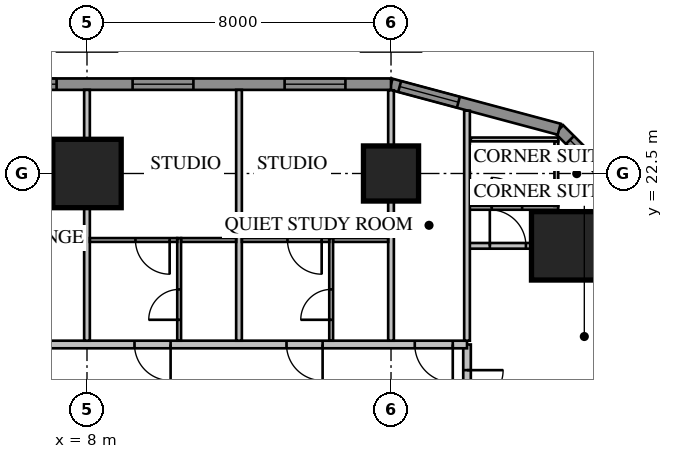
"""IFC4 building model, lengths in metres.
Left out: names, types, materials, properties, quantities, classifications, styles, units other than length and angle.
Written with IfcOpenShell. Run it as: python <this file> out.ifc"""

import sys

from ifc_helpers import new_model, si_unit, direction, frame, frame_2d, origin, origin_2d, place, context, subcontext, project, spatial, rectangle, extrude, element, fill, save


model = new_model("IFC4")
c1 = context("Model", 3, precision=1e-05, world=origin(), true_north=direction((0.0, 1.0)))
c2 = subcontext(c1, "Body", "Model", "MODEL_VIEW")
j1 = project(units=[si_unit("LENGTHUNIT", "METRE"), si_unit("PLANEANGLEUNIT", "RADIAN")], contexts=[c1])
p1 = place(None, origin())
s1 = spatial("IfcSite", under=j1, at=p1, CompositionType="ELEMENT")
p2 = place(p1, origin())
s2 = spatial("IfcBuilding", under=s1, at=p2, CompositionType="ELEMENT")
p3 = place(p2, frame((0.0, 0.0, 23.7)))
s3 = spatial("IfcBuildingStorey", under=s2, at=p3, CompositionType="ELEMENT", Elevation=23.7)
p4 = place(p3, frame((20.596, 20.596, 0.0), z_axis=(0.0, 0.0, 1.0), x_axis=(1.0, 0.0, 0.0)))
e1 = element("IfcColumn", 1, at=p4, inside=s3, PredefinedType="COLUMN", context=c2, shape_type="SweptSolid", body=[
    extrude(rectangle(XDim=1.8, YDim=1.8, at=origin_2d()), origin(), (0.0, 0.0, 1.0), 3.85),
])
p5 = place(p3, frame((16.0, 22.5, 0.0), z_axis=(0.0, 0.0, 1.0), x_axis=(1.0, 0.0, 0.0)))
e2 = element("IfcColumn", 2, at=p5, inside=s3, PredefinedType="COLUMN", context=c2, shape_type="SweptSolid", body=[
    extrude(rectangle(XDim=1.45, YDim=1.45, at=origin_2d()), origin(), (0.0, 0.0, 1.0), 3.85),
])
p6 = place(p3, frame((8.0, 22.5, 0.0), z_axis=(0.0, 0.0, 1.0), x_axis=(1.0, 0.0, 0.0)))
e3 = element("IfcColumn", 3, at=p6, inside=s3, PredefinedType="COLUMN", context=c2, shape_type="SweptSolid", body=[
    extrude(rectangle(XDim=1.8, YDim=1.8, at=origin_2d()), origin(), (0.0, 0.0, 1.0), 3.85),
])
p7 = place(p3, frame((23.664, 20.425, 0.0), z_axis=(0.0, 0.0, 1.0), x_axis=(-0.707106781187, 0.707106781187, 0.0)))
e4 = element("IfcWall", 4, at=p7, inside=s3, PredefinedType="SOLIDWALL", context=c2, shape_type="SweptSolid", body=[
    extrude(rectangle(XDim=4.581, YDim=0.3, at=frame_2d((2.291, 0.0))), origin(), (0.0, 0.0, 1.0), 3.65),
])
p8 = place(p7, frame((0.4, 0.0, 0.75)))
e5 = element("IfcOpeningElement", 5, at=p8, cuts=e4, PredefinedType="OPENING", context=c2, shape_type="SweptSolid", body=[
    extrude(rectangle(XDim=3.781, YDim=1.8, at=frame_2d((1.891, 0.9))), frame((0.0, 0.17, 0.0), z_axis=(0.0, -1.0, 0.0), x_axis=(1.0, 0.0, 0.0)), (0.0, 0.0, 1.0), 0.34),
])
p9 = place(p3, frame((20.425, 23.664, 0.0), z_axis=(0.0, 0.0, 1.0), x_axis=(-0.965920218567, 0.258839972501, 0.0)))
e6 = element("IfcWall", 6, at=p9, inside=s3, PredefinedType="SOLIDWALL", context=c2, shape_type="SweptSolid", body=[
    extrude(rectangle(XDim=4.581, YDim=0.3, at=frame_2d((2.291, 0.0))), origin(), (0.0, 0.0, 1.0), 3.65),
])
p10 = place(p9, frame((2.746, 0.0, 0.75)))
e7 = element("IfcOpeningElement", 7, at=p10, cuts=e6, PredefinedType="OPENING", context=c2, shape_type="SweptSolid", body=[
    extrude(rectangle(XDim=1.6, YDim=1.8, at=frame_2d((0.8, 0.9))), frame((0.0, 0.17, 0.0), z_axis=(0.0, -1.0, 0.0), x_axis=(1.0, 0.0, 0.0)), (0.0, 0.0, 1.0), 0.34),
])
p11 = place(p3, frame((16.0, 24.85, 0.0), z_axis=(0.0, 0.0, 1.0), x_axis=(-1.0, 0.0, 0.0)))
e8 = element("IfcWall", 8, at=p11, inside=s3, PredefinedType="SOLIDWALL", context=c2, shape_type="SweptSolid", body=[
    extrude(rectangle(XDim=32.0, YDim=0.3, at=frame_2d((16.0, 0.0))), origin(), (0.0, 0.0, 1.0), 3.65),
])
p12 = place(p11, frame((1.2, 0.0, 0.75)))
e9 = element("IfcOpeningElement", 9, at=p12, cuts=e8, PredefinedType="OPENING", context=c2, shape_type="SweptSolid", body=[
    extrude(rectangle(XDim=1.6, YDim=1.8, at=frame_2d((0.8, 0.9))), frame((0.0, 0.17, 0.0), z_axis=(0.0, -1.0, 0.0), x_axis=(1.0, 0.0, 0.0)), (0.0, 0.0, 1.0), 0.34),
])
p13 = place(p11, frame((5.2, 0.0, 0.75)))
e10 = element("IfcOpeningElement", 10, at=p13, cuts=e8, PredefinedType="OPENING", context=c2, shape_type="SweptSolid", body=[
    extrude(rectangle(XDim=1.6, YDim=1.8, at=frame_2d((0.8, 0.9))), frame((0.0, 0.17, 0.0), z_axis=(0.0, -1.0, 0.0), x_axis=(1.0, 0.0, 0.0)), (0.0, 0.0, 1.0), 0.34),
])
p14 = place(p11, frame((17.2, 0.0, 0.75)))
e11 = element("IfcOpeningElement", 11, at=p14, cuts=e8, PredefinedType="OPENING", context=c2, shape_type="SweptSolid", body=[
    extrude(rectangle(XDim=1.6, YDim=1.8, at=frame_2d((0.8, 0.9))), frame((0.0, 0.17, 0.0), z_axis=(0.0, -1.0, 0.0), x_axis=(1.0, 0.0, 0.0)), (0.0, 0.0, 1.0), 0.34),
])
p15 = place(p11, frame((21.2, 0.0, 0.75)))
e12 = element("IfcOpeningElement", 12, at=p15, cuts=e8, PredefinedType="OPENING", context=c2, shape_type="SweptSolid", body=[
    extrude(rectangle(XDim=1.6, YDim=1.8, at=frame_2d((0.8, 0.9))), frame((0.0, 0.17, 0.0), z_axis=(0.0, -1.0, 0.0), x_axis=(1.0, 0.0, 0.0)), (0.0, 0.0, 1.0), 0.34),
])
p16 = place(p11, frame((25.2, 0.0, 0.75)))
e13 = element("IfcOpeningElement", 13, at=p16, cuts=e8, PredefinedType="OPENING", context=c2, shape_type="SweptSolid", body=[
    extrude(rectangle(XDim=1.6, YDim=1.8, at=frame_2d((0.8, 0.9))), frame((0.0, 0.17, 0.0), z_axis=(0.0, -1.0, 0.0), x_axis=(1.0, 0.0, 0.0)), (0.0, 0.0, 1.0), 0.34),
])
p17 = place(p11, frame((29.2, 0.0, 0.75)))
e14 = element("IfcOpeningElement", 14, at=p17, cuts=e8, PredefinedType="OPENING", context=c2, shape_type="SweptSolid", body=[
    extrude(rectangle(XDim=1.6, YDim=1.8, at=frame_2d((0.8, 0.9))), frame((0.0, 0.17, 0.0), z_axis=(0.0, -1.0, 0.0), x_axis=(1.0, 0.0, 0.0)), (0.0, 0.0, 1.0), 0.34),
])
p18 = place(p11, frame((8.8, 0.0, 0.75)))
e15 = element("IfcOpeningElement", 15, at=p18, cuts=e8, PredefinedType="OPENING", context=c2, shape_type="SweptSolid", body=[
    extrude(rectangle(XDim=2.4, YDim=1.8, at=frame_2d((1.2, 0.9))), frame((0.0, 0.17, 0.0), z_axis=(0.0, -1.0, 0.0), x_axis=(1.0, 0.0, 0.0)), (0.0, 0.0, 1.0), 0.34),
])
p19 = place(p11, frame((13.812, 0.0, 0.0)))
e16 = element("IfcOpeningElement", 16, at=p19, cuts=e8, PredefinedType="OPENING", context=c2, shape_type="SweptSolid", body=[
    extrude(rectangle(XDim=1.0, YDim=2.4, at=frame_2d((0.5, 1.2))), frame((0.0, 0.17, 0.0), z_axis=(0.0, -1.0, 0.0), x_axis=(1.0, 0.0, 0.0)), (0.0, 0.0, 1.0), 0.34),
])
p20 = place(p3, frame((18.0, -18.0, 0.0), z_axis=(0.0, 0.0, 1.0), x_axis=(0.0, 1.0, 0.0)))
e17 = element("IfcWall", 17, at=p20, inside=s3, PredefinedType="PARTITIONING", context=c2, shape_type="SweptSolid", body=[
    extrude(rectangle(XDim=36.0, YDim=0.2, at=frame_2d((18.0, 0.0))), origin(), (0.0, 0.0, 1.0), 3.65),
])
p21 = place(p20, frame((10.4, 0.0, 0.0)))
e18 = element("IfcOpeningElement", 18, at=p21, cuts=e17, PredefinedType="OPENING", context=c2, shape_type="SweptSolid", body=[
    extrude(rectangle(XDim=1.0, YDim=2.1, at=frame_2d((0.5, 1.05))), frame((0.0, 0.12, 0.0), z_axis=(0.0, -1.0, 0.0), x_axis=(1.0, 0.0, 0.0)), (0.0, 0.0, 1.0), 0.24),
])
p22 = place(p20, frame((0.375, 0.0, 0.0)))
e19 = element("IfcOpeningElement", 19, at=p22, cuts=e17, PredefinedType="OPENING", context=c2, shape_type="SweptSolid", body=[
    extrude(rectangle(XDim=1.0, YDim=2.1, at=frame_2d((0.5, 1.05))), frame((0.0, 0.12, 0.0), z_axis=(0.0, -1.0, 0.0), x_axis=(1.0, 0.0, 0.0)), (0.0, 0.0, 1.0), 0.24),
])
p23 = place(p20, frame((34.375, 0.0, 0.0)))
e20 = element("IfcOpeningElement", 20, at=p23, cuts=e17, PredefinedType="OPENING", context=c2, shape_type="SweptSolid", body=[
    extrude(rectangle(XDim=0.95, YDim=2.1, at=frame_2d((0.475, 1.05))), frame((0.0, 0.12, 0.0), z_axis=(0.0, -1.0, 0.0), x_axis=(1.0, 0.0, 0.0)), (0.0, 0.0, 1.0), 0.24),
])
p24 = place(p3, frame((18.065, 21.596, 0.0), z_axis=(0.0, 0.0, 1.0), x_axis=(1.0, 0.0, 0.0)))
e21 = element("IfcWall", 21, at=p24, inside=s3, PredefinedType="PARTITIONING", context=c2, shape_type="SweptSolid", body=[
    extrude(rectangle(XDim=2.335, YDim=0.1, at=frame_2d((1.167, 0.0))), origin(), (0.0, 0.0, 1.0), 3.65),
])
p25 = place(p24, frame((0.585, 0.0, 0.0)))
e22 = element("IfcOpeningElement", 22, at=p25, cuts=e21, PredefinedType="OPENING", context=c2, shape_type="SweptSolid", body=[
    extrude(rectangle(XDim=0.8, YDim=2.1, at=frame_2d((0.4, 1.05))), frame((0.0, 0.07, 0.0), z_axis=(0.0, -1.0, 0.0), x_axis=(1.0, 0.0, 0.0)), (0.0, 0.0, 1.0), 0.14),
])
p26 = place(p3, frame((20.35, 21.646, 0.0), z_axis=(0.0, 0.0, 1.0), x_axis=(0.0, 1.0, 0.0)))
e23 = element("IfcWall", 23, at=p26, inside=s3, PredefinedType="PARTITIONING", context=c2, shape_type="SweptSolid", body=[
    extrude(rectangle(XDim=1.7, YDim=0.1, at=frame_2d((0.85, 0.0))), origin(), (0.0, 0.0, 1.0), 3.65),
])
p27 = place(p3, frame((18.1, 23.396, 0.0), z_axis=(0.0, 0.0, 1.0), x_axis=(1.0, 0.0, 0.0)))
e24 = element("IfcWall", 24, at=p27, inside=s3, PredefinedType="PARTITIONING", context=c2, shape_type="SweptSolid", body=[
    extrude(rectangle(XDim=2.3, YDim=0.1, at=frame_2d((1.15, 0.0))), origin(), (0.0, 0.0, 1.0), 3.65),
])
p28 = place(p3, frame((18.065, 20.596, 0.0), z_axis=(0.0, 0.0, 1.0), x_axis=(1.0, 0.0, 0.0)))
e25 = element("IfcWall", 25, at=p28, inside=s3, PredefinedType="PARTITIONING", context=c2, shape_type="SweptSolid", body=[
    extrude(rectangle(XDim=5.209, YDim=0.15, at=frame_2d((2.604, 0.0))), origin(), (0.0, 0.0, 1.0), 3.65),
])
p29 = place(p28, frame((0.535, 0.0, 0.0)))
e26 = element("IfcOpeningElement", 26, at=p29, cuts=e25, PredefinedType="OPENING", context=c2, shape_type="SweptSolid", body=[
    extrude(rectangle(XDim=0.95, YDim=2.1, at=frame_2d((0.475, 1.05))), frame((0.0, 0.095, 0.0), z_axis=(0.0, -1.0, 0.0), x_axis=(1.0, 0.0, 0.0)), (0.0, 0.0, 1.0), 0.19),
])
p30 = place(p3, frame((18.0, 18.0, 0.0), z_axis=(0.0, 0.0, 1.0), x_axis=(-1.0, 0.0, 0.0)))
e27 = element("IfcWall", 27, at=p30, inside=s3, PredefinedType="PARTITIONING", context=c2, shape_type="SweptSolid", body=[
    extrude(rectangle(XDim=36.0, YDim=0.2, at=frame_2d((18.0, 0.0))), origin(), (0.0, 0.0, 1.0), 3.65),
])
p31 = place(p30, frame((0.375, 0.0, 0.0)))
e28 = element("IfcOpeningElement", 28, at=p31, cuts=e27, PredefinedType="OPENING", context=c2, shape_type="SweptSolid", body=[
    extrude(rectangle(XDim=1.0, YDim=2.1, at=frame_2d((0.5, 1.05))), frame((0.0, 0.12, 0.0), z_axis=(0.0, -1.0, 0.0), x_axis=(1.0, 0.0, 0.0)), (0.0, 0.0, 1.0), 0.24),
])
p32 = place(p30, frame((3.8, 0.0, 0.0)))
e29 = element("IfcOpeningElement", 29, at=p32, cuts=e27, PredefinedType="OPENING", context=c2, shape_type="SweptSolid", body=[
    extrude(rectangle(XDim=0.95, YDim=2.1, at=frame_2d((0.475, 1.05))), frame((0.0, 0.12, 0.0), z_axis=(0.0, -1.0, 0.0), x_axis=(1.0, 0.0, 0.0)), (0.0, 0.0, 1.0), 0.24),
])
p33 = place(p30, frame((7.8, 0.0, 0.0)))
e30 = element("IfcOpeningElement", 30, at=p33, cuts=e27, PredefinedType="OPENING", context=c2, shape_type="SweptSolid", body=[
    extrude(rectangle(XDim=0.95, YDim=2.1, at=frame_2d((0.475, 1.05))), frame((0.0, 0.12, 0.0), z_axis=(0.0, -1.0, 0.0), x_axis=(1.0, 0.0, 0.0)), (0.0, 0.0, 1.0), 0.24),
])
p34 = place(p30, frame((19.8, 0.0, 0.0)))
e31 = element("IfcOpeningElement", 31, at=p34, cuts=e27, PredefinedType="OPENING", context=c2, shape_type="SweptSolid", body=[
    extrude(rectangle(XDim=0.95, YDim=2.1, at=frame_2d((0.475, 1.05))), frame((0.0, 0.12, 0.0), z_axis=(0.0, -1.0, 0.0), x_axis=(1.0, 0.0, 0.0)), (0.0, 0.0, 1.0), 0.24),
])
p35 = place(p30, frame((23.8, 0.0, 0.0)))
e32 = element("IfcOpeningElement", 32, at=p35, cuts=e27, PredefinedType="OPENING", context=c2, shape_type="SweptSolid", body=[
    extrude(rectangle(XDim=0.95, YDim=2.1, at=frame_2d((0.475, 1.05))), frame((0.0, 0.12, 0.0), z_axis=(0.0, -1.0, 0.0), x_axis=(1.0, 0.0, 0.0)), (0.0, 0.0, 1.0), 0.24),
])
p36 = place(p30, frame((27.8, 0.0, 0.0)))
e33 = element("IfcOpeningElement", 33, at=p36, cuts=e27, PredefinedType="OPENING", context=c2, shape_type="SweptSolid", body=[
    extrude(rectangle(XDim=0.95, YDim=2.1, at=frame_2d((0.475, 1.05))), frame((0.0, 0.12, 0.0), z_axis=(0.0, -1.0, 0.0), x_axis=(1.0, 0.0, 0.0)), (0.0, 0.0, 1.0), 0.24),
])
p37 = place(p30, frame((31.8, 0.0, 0.0)))
e34 = element("IfcOpeningElement", 34, at=p37, cuts=e27, PredefinedType="OPENING", context=c2, shape_type="SweptSolid", body=[
    extrude(rectangle(XDim=0.95, YDim=2.1, at=frame_2d((0.475, 1.05))), frame((0.0, 0.12, 0.0), z_axis=(0.0, -1.0, 0.0), x_axis=(1.0, 0.0, 0.0)), (0.0, 0.0, 1.0), 0.24),
])
p38 = place(p30, frame((34.375, 0.0, 0.0)))
e35 = element("IfcOpeningElement", 35, at=p38, cuts=e27, PredefinedType="OPENING", context=c2, shape_type="SweptSolid", body=[
    extrude(rectangle(XDim=0.95, YDim=2.1, at=frame_2d((0.475, 1.05))), frame((0.0, 0.12, 0.0), z_axis=(0.0, -1.0, 0.0), x_axis=(1.0, 0.0, 0.0)), (0.0, 0.0, 1.0), 0.24),
])
p39 = place(p30, frame((11.2, 0.0, 0.0)))
e36 = element("IfcOpeningElement", 36, at=p39, cuts=e27, PredefinedType="OPENING", context=c2, shape_type="SweptSolid", body=[
    extrude(rectangle(XDim=1.0, YDim=2.1, at=frame_2d((0.5, 1.05))), frame((0.0, 0.12, 0.0), z_axis=(0.0, -1.0, 0.0), x_axis=(1.0, 0.0, 0.0)), (0.0, 0.0, 1.0), 0.24),
])
p40 = place(p3, frame((18.0, 18.1, 0.0), z_axis=(0.0, 0.0, 1.0), x_axis=(0.0, 1.0, 0.0)))
e37 = element("IfcWall", 37, at=p40, inside=s3, PredefinedType="PARTITIONING", context=c2, shape_type="SweptSolid", body=[
    extrude(rectangle(XDim=6.053, YDim=0.15, at=frame_2d((3.027, 0.0))), origin(), (0.0, 0.0, 1.0), 3.65),
])
p41 = place(p3, frame((16.0, 18.1, 0.0), z_axis=(0.0, 0.0, 1.0), x_axis=(0.0, 1.0, 0.0)))
e38 = element("IfcWall", 38, at=p41, inside=s3, PredefinedType="PARTITIONING", context=c2, shape_type="SweptSolid", body=[
    extrude(rectangle(XDim=6.589, YDim=0.15, at=frame_2d((3.295, 0.0))), origin(), (0.0, 0.0, 1.0), 3.65),
])
for number, where, z_axis, x_axis in (
    (39, (12.0, 18.1, 0.0), (0.0, 0.0, 1.0), (0.0, 1.0, 0.0)),
    (40, (8.0, 18.1, 0.0), (0.0, 0.0, 1.0), (0.0, 1.0, 0.0)),
):
    element("IfcWall", number, at=place(p3, frame(where, z_axis=z_axis, x_axis=x_axis)), inside=s3, PredefinedType="PARTITIONING", context=c2, shape_type="SweptSolid", body=[
        extrude(rectangle(XDim=6.6, YDim=0.15, at=frame_2d((3.3, 0.0))), origin(), (0.0, 0.0, 1.0), 3.65),
    ])
p42 = place(p3, frame((14.425, 18.1, 0.0), z_axis=(0.0, 0.0, 1.0), x_axis=(0.0, 1.0, 0.0)))
e41 = element("IfcWall", 41, at=p42, inside=s3, PredefinedType="PARTITIONING", context=c2, shape_type="SweptSolid", body=[
    extrude(rectangle(XDim=2.7, YDim=0.1, at=frame_2d((1.35, 0.0))), origin(), (0.0, 0.0, 1.0), 3.65),
])
p43 = place(p42, frame((0.55, 0.0, 0.0)))
e42 = element("IfcOpeningElement", 42, at=p43, cuts=e41, PredefinedType="OPENING", context=c2, shape_type="SweptSolid", body=[
    extrude(rectangle(XDim=0.8, YDim=2.1, at=frame_2d((0.4, 1.05))), frame((0.0, 0.07, 0.0), z_axis=(0.0, -1.0, 0.0), x_axis=(1.0, 0.0, 0.0)), (0.0, 0.0, 1.0), 0.14),
])
p44 = place(p3, frame((15.925, 20.75, 0.0), z_axis=(0.0, 0.0, 1.0), x_axis=(-1.0, 0.0, 0.0)))
e43 = element("IfcWall", 43, at=p44, inside=s3, PredefinedType="PARTITIONING", context=c2, shape_type="SweptSolid", body=[
    extrude(rectangle(XDim=1.45, YDim=0.1, at=frame_2d((0.725, 0.0))), origin(), (0.0, 0.0, 1.0), 3.65),
])
p45 = place(p3, frame((10.425, 18.1, 0.0), z_axis=(0.0, 0.0, 1.0), x_axis=(0.0, 1.0, 0.0)))
e44 = element("IfcWall", 44, at=p45, inside=s3, PredefinedType="PARTITIONING", context=c2, shape_type="SweptSolid", body=[
    extrude(rectangle(XDim=2.7, YDim=0.1, at=frame_2d((1.35, 0.0))), origin(), (0.0, 0.0, 1.0), 3.65),
])
p46 = place(p45, frame((0.55, 0.0, 0.0)))
e45 = element("IfcOpeningElement", 45, at=p46, cuts=e44, PredefinedType="OPENING", context=c2, shape_type="SweptSolid", body=[
    extrude(rectangle(XDim=0.8, YDim=2.1, at=frame_2d((0.4, 1.05))), frame((0.0, 0.07, 0.0), z_axis=(0.0, -1.0, 0.0), x_axis=(1.0, 0.0, 0.0)), (0.0, 0.0, 1.0), 0.14),
])
p47 = place(p3, frame((11.925, 20.75, 0.0), z_axis=(0.0, 0.0, 1.0), x_axis=(-1.0, 0.0, 0.0)))
e46 = element("IfcWall", 46, at=p47, inside=s3, PredefinedType="PARTITIONING", context=c2, shape_type="SweptSolid", body=[
    extrude(rectangle(XDim=1.45, YDim=0.1, at=frame_2d((0.725, 0.0))), origin(), (0.0, 0.0, 1.0), 3.65),
])
p48 = place(p3, frame((14.375, 20.75, 0.0), z_axis=(0.0, 0.0, 1.0), x_axis=(-1.0, 0.0, 0.0)))
e47 = element("IfcWall", 47, at=p48, inside=s3, PredefinedType="PARTITIONING", context=c2, shape_type="SweptSolid", body=[
    extrude(rectangle(XDim=2.3, YDim=0.1, at=frame_2d((1.15, 0.0))), origin(), (0.0, 0.0, 1.0), 3.65),
])
p49 = place(p48, frame((0.2, 0.0, 0.0)))
e48 = element("IfcOpeningElement", 48, at=p49, cuts=e47, PredefinedType="OPENING", context=c2, shape_type="SweptSolid", body=[
    extrude(rectangle(XDim=0.9, YDim=2.1, at=frame_2d((0.45, 1.05))), frame((0.0, 0.07, 0.0), z_axis=(0.0, -1.0, 0.0), x_axis=(1.0, 0.0, 0.0)), (0.0, 0.0, 1.0), 0.14),
])
p50 = place(p3, frame((10.375, 20.75, 0.0), z_axis=(0.0, 0.0, 1.0), x_axis=(-1.0, 0.0, 0.0)))
e49 = element("IfcWall", 49, at=p50, inside=s3, PredefinedType="PARTITIONING", context=c2, shape_type="SweptSolid", body=[
    extrude(rectangle(XDim=2.3, YDim=0.1, at=frame_2d((1.15, 0.0))), origin(), (0.0, 0.0, 1.0), 3.65),
])
p51 = place(p50, frame((0.2, 0.0, 0.0)))
e50 = element("IfcOpeningElement", 50, at=p51, cuts=e49, PredefinedType="OPENING", context=c2, shape_type="SweptSolid", body=[
    extrude(rectangle(XDim=0.9, YDim=2.1, at=frame_2d((0.45, 1.05))), frame((0.0, 0.07, 0.0), z_axis=(0.0, -1.0, 0.0), x_axis=(1.0, 0.0, 0.0)), (0.0, 0.0, 1.0), 0.14),
])
p52 = place(p8, origin())
e51 = element("IfcWindow", 51, at=p52, inside=s3, PartitioningType="SINGLE_PANEL", PredefinedType="WINDOW", context=c2, shape_type="SweptSolid", body=[
    extrude(rectangle(XDim=3.781, YDim=1.8, at=frame_2d((1.891, 0.9))), frame((0.0, 0.03, 0.0), z_axis=(0.0, -1.0, 0.0), x_axis=(1.0, 0.0, 0.0)), (0.0, 0.0, 1.0), 0.06),
])
fill(e5, e51)
p53 = place(p10, origin())
e52 = element("IfcWindow", 52, at=p53, inside=s3, PartitioningType="SINGLE_PANEL", PredefinedType="WINDOW", context=c2, shape_type="SweptSolid", body=[
    extrude(rectangle(XDim=1.6, YDim=1.8, at=frame_2d((0.8, 0.9))), frame((0.0, 0.03, 0.0), z_axis=(0.0, -1.0, 0.0), x_axis=(1.0, 0.0, 0.0)), (0.0, 0.0, 1.0), 0.06),
])
fill(e7, e52)
p54 = place(p12, origin())
e53 = element("IfcWindow", 53, at=p54, inside=s3, PartitioningType="SINGLE_PANEL", PredefinedType="WINDOW", context=c2, shape_type="SweptSolid", body=[
    extrude(rectangle(XDim=1.6, YDim=1.8, at=frame_2d((0.8, 0.9))), frame((0.0, 0.03, 0.0), z_axis=(0.0, -1.0, 0.0), x_axis=(1.0, 0.0, 0.0)), (0.0, 0.0, 1.0), 0.06),
])
fill(e9, e53)
p55 = place(p13, origin())
e54 = element("IfcWindow", 54, at=p55, inside=s3, PartitioningType="SINGLE_PANEL", PredefinedType="WINDOW", context=c2, shape_type="SweptSolid", body=[
    extrude(rectangle(XDim=1.6, YDim=1.8, at=frame_2d((0.8, 0.9))), frame((0.0, 0.03, 0.0), z_axis=(0.0, -1.0, 0.0), x_axis=(1.0, 0.0, 0.0)), (0.0, 0.0, 1.0), 0.06),
])
fill(e10, e54)
p56 = place(p18, origin())
e55 = element("IfcWindow", 55, at=p56, inside=s3, PartitioningType="SINGLE_PANEL", PredefinedType="WINDOW", context=c2, shape_type="SweptSolid", body=[
    extrude(rectangle(XDim=2.4, YDim=1.8, at=frame_2d((1.2, 0.9))), frame((0.0, 0.03, 0.0), z_axis=(0.0, -1.0, 0.0), x_axis=(1.0, 0.0, 0.0)), (0.0, 0.0, 1.0), 0.06),
])
fill(e15, e55)
p57 = place(p23, origin())
e56 = element("IfcDoor", 56, at=p57, inside=s3, OperationType="SINGLE_SWING_RIGHT", PredefinedType="DOOR", context=c2, shape_type="SweptSolid", body=[
    extrude(rectangle(XDim=0.95, YDim=2.1, at=frame_2d((0.475, 1.05))), frame((0.0, 0.025, 0.0), z_axis=(0.0, -1.0, 0.0), x_axis=(1.0, 0.0, 0.0)), (0.0, 0.0, 1.0), 0.05),
])
fill(e20, e56)
p58 = place(p25, origin())
e57 = element("IfcDoor", 57, at=p58, inside=s3, OperationType="SINGLE_SWING_LEFT", PredefinedType="DOOR", context=c2, shape_type="SweptSolid", body=[
    extrude(rectangle(XDim=0.8, YDim=2.1, at=frame_2d((0.4, 1.05))), frame((0.0, 0.025, 0.0), z_axis=(0.0, -1.0, 0.0), x_axis=(1.0, 0.0, 0.0)), (0.0, 0.0, 1.0), 0.05),
])
fill(e22, e57)
p59 = place(p29, origin())
e58 = element("IfcDoor", 58, at=p59, inside=s3, OperationType="SINGLE_SWING_LEFT", PredefinedType="DOOR", context=c2, shape_type="SweptSolid", body=[
    extrude(rectangle(XDim=0.95, YDim=2.1, at=frame_2d((0.475, 1.05))), frame((0.0, 0.025, 0.0), z_axis=(0.0, -1.0, 0.0), x_axis=(1.0, 0.0, 0.0)), (0.0, 0.0, 1.0), 0.05),
])
fill(e26, e58)
p60 = place(p31, origin())
e59 = element("IfcDoor", 59, at=p60, inside=s3, OperationType="SINGLE_SWING_LEFT", PredefinedType="DOOR", context=c2, shape_type="SweptSolid", body=[
    extrude(rectangle(XDim=1.0, YDim=2.1, at=frame_2d((0.5, 1.05))), frame((0.0, 0.025, 0.0), z_axis=(0.0, -1.0, 0.0), x_axis=(1.0, 0.0, 0.0)), (0.0, 0.0, 1.0), 0.05),
])
fill(e28, e59)
p61 = place(p32, origin())
e60 = element("IfcDoor", 60, at=p61, inside=s3, OperationType="SINGLE_SWING_LEFT", PredefinedType="DOOR", context=c2, shape_type="SweptSolid", body=[
    extrude(rectangle(XDim=0.95, YDim=2.1, at=frame_2d((0.475, 1.05))), frame((0.0, 0.025, 0.0), z_axis=(0.0, -1.0, 0.0), x_axis=(1.0, 0.0, 0.0)), (0.0, 0.0, 1.0), 0.05),
])
fill(e29, e60)
p62 = place(p43, origin())
e61 = element("IfcDoor", 61, at=p62, inside=s3, OperationType="SINGLE_SWING_LEFT", PredefinedType="DOOR", context=c2, shape_type="SweptSolid", body=[
    extrude(rectangle(XDim=0.8, YDim=2.1, at=frame_2d((0.4, 1.05))), frame((0.0, 0.025, 0.0), z_axis=(0.0, -1.0, 0.0), x_axis=(1.0, 0.0, 0.0)), (0.0, 0.0, 1.0), 0.05),
])
fill(e42, e61)
p63 = place(p33, origin())
e62 = element("IfcDoor", 62, at=p63, inside=s3, OperationType="SINGLE_SWING_LEFT", PredefinedType="DOOR", context=c2, shape_type="SweptSolid", body=[
    extrude(rectangle(XDim=0.95, YDim=2.1, at=frame_2d((0.475, 1.05))), frame((0.0, 0.025, 0.0), z_axis=(0.0, -1.0, 0.0), x_axis=(1.0, 0.0, 0.0)), (0.0, 0.0, 1.0), 0.05),
])
fill(e30, e62)
p64 = place(p46, origin())
e63 = element("IfcDoor", 63, at=p64, inside=s3, OperationType="SINGLE_SWING_LEFT", PredefinedType="DOOR", context=c2, shape_type="SweptSolid", body=[
    extrude(rectangle(XDim=0.8, YDim=2.1, at=frame_2d((0.4, 1.05))), frame((0.0, 0.025, 0.0), z_axis=(0.0, -1.0, 0.0), x_axis=(1.0, 0.0, 0.0)), (0.0, 0.0, 1.0), 0.05),
])
fill(e45, e63)
p65 = place(p49, origin())
e64 = element("IfcDoor", 64, at=p65, inside=s3, OperationType="SINGLE_SWING_LEFT", PredefinedType="DOOR", context=c2, shape_type="SweptSolid", body=[
    extrude(rectangle(XDim=0.9, YDim=2.1, at=frame_2d((0.45, 1.05))), frame((0.0, 0.025, 0.0), z_axis=(0.0, -1.0, 0.0), x_axis=(1.0, 0.0, 0.0)), (0.0, 0.0, 1.0), 0.05),
])
fill(e48, e64)
p66 = place(p51, origin())
e65 = element("IfcDoor", 65, at=p66, inside=s3, OperationType="SINGLE_SWING_LEFT", PredefinedType="DOOR", context=c2, shape_type="SweptSolid", body=[
    extrude(rectangle(XDim=0.9, YDim=2.1, at=frame_2d((0.45, 1.05))), frame((0.0, 0.025, 0.0), z_axis=(0.0, -1.0, 0.0), x_axis=(1.0, 0.0, 0.0)), (0.0, 0.0, 1.0), 0.05),
])
fill(e50, e65)
save(model, sys.argv[1])
